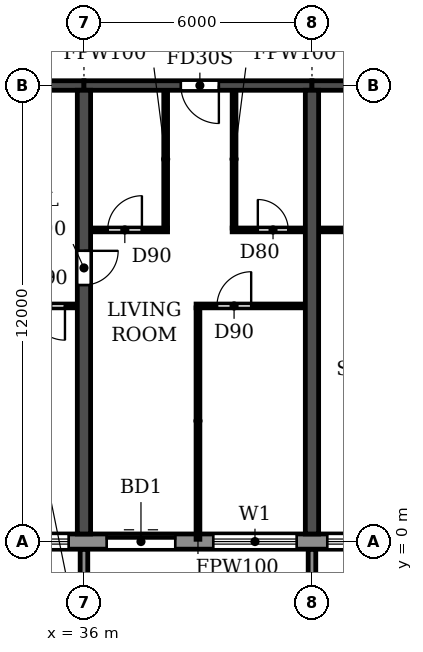
"""IFC4 building model, lengths in metres.
Left out: names, types, materials, properties, quantities, classifications, styles, units other than length and angle.
Written with IfcOpenShell. Run it as: python <this file> out.ifc"""

import sys

from ifc_helpers import new_model, si_unit, direction, frame, frame_2d, origin, place, context, subcontext, project, spatial, polyline, rectangle, outline, extrude, source, transform, mapped, element, fill, save


model = new_model("IFC4")
c1 = context("Model", 3, precision=1e-05, world=origin(), true_north=direction((0.0, 1.0)))
c2 = subcontext(c1, "Body", "Model", "MODEL_VIEW")
j1 = project(units=[si_unit("LENGTHUNIT", "METRE"), si_unit("PLANEANGLEUNIT", "RADIAN")], contexts=[c1])
p1 = place(None, origin())
s1 = spatial("IfcSite", under=j1, at=p1, CompositionType="ELEMENT")
p2 = place(p1, origin())
s2 = spatial("IfcBuilding", under=s1, at=p2, CompositionType="ELEMENT")
p3 = place(p2, frame((0.0, 0.0, 76.2)))
s3 = spatial("IfcBuildingStorey", under=s2, at=p3, CompositionType="ELEMENT", Elevation=76.2)
p4 = place(p3, frame((36.0, 0.2, 0.0), z_axis=(0.0, 0.0, 1.0), x_axis=(0.0, 1.0, 0.0)))
e1 = element("IfcWall", 1, at=p4, inside=s3, PredefinedType="SHEAR", context=c2, shape_type="SweptSolid", body=[
    extrude(rectangle(XDim=11.675, YDim=0.35, at=frame_2d((5.837, 0.0))), origin(), (0.0, 0.0, 1.0), 3.06),
])
p5 = place(p4, frame((6.55, 0.0, 0.0)))
e2 = element("IfcOpeningElement", 2, at=p5, cuts=e1, PredefinedType="OPENING", context=c2, shape_type="SweptSolid", body=[
    extrude(rectangle(XDim=0.9, YDim=2.1, at=frame_2d((0.45, 1.05))), frame((0.0, 0.185, 0.0), z_axis=(0.0, -1.0, 0.0), x_axis=(1.0, 0.0, 0.0)), (0.0, 0.0, 1.0), 0.37),
])
p6 = place(p3, frame((42.0, 0.2, 0.0), z_axis=(0.0, 0.0, 1.0), x_axis=(0.0, 1.0, 0.0)))
e3 = element("IfcWall", 3, at=p6, inside=s3, PredefinedType="SHEAR", context=c2, shape_type="SweptSolid", body=[
    extrude(rectangle(XDim=11.675, YDim=0.35, at=frame_2d((5.837, 0.0))), origin(), (0.0, 0.0, 1.0), 3.06),
])
p7 = place(p3, frame((30.0, 12.0, 0.0), z_axis=(0.0, 0.0, 1.0), x_axis=(1.0, 0.0, 0.0)))
e4 = element("IfcWall", 4, at=p7, inside=s3, PredefinedType="SHEAR", context=c2, shape_type="SweptSolid", body=[
    extrude(rectangle(XDim=6.0, YDim=0.25, at=frame_2d((3.0, 0.0))), origin(), (0.0, 0.0, 1.0), 2.46),
])
p8 = place(p3, frame((36.0, 12.0, 0.0), z_axis=(0.0, 0.0, 1.0), x_axis=(1.0, 0.0, 0.0)))
e5 = element("IfcWall", 5, at=p8, inside=s3, PredefinedType="SHEAR", context=c2, shape_type="SweptSolid", body=[
    extrude(rectangle(XDim=6.0, YDim=0.25, at=frame_2d((3.0, 0.0))), origin(), (0.0, 0.0, 1.0), 2.46),
])
p9 = place(p8, frame((2.55, 0.0, 0.0)))
e6 = element("IfcOpeningElement", 6, at=p9, cuts=e5, PredefinedType="OPENING", context=c2, shape_type="SweptSolid", body=[
    extrude(rectangle(XDim=1.0, YDim=2.1, at=frame_2d((0.5, 1.05))), frame((0.0, 0.135, 0.0), z_axis=(0.0, -1.0, 0.0), x_axis=(1.0, 0.0, 0.0)), (0.0, 0.0, 1.0), 0.27),
])
p10 = place(p3, frame((42.0, 12.0, 0.0), z_axis=(0.0, 0.0, 1.0), x_axis=(1.0, 0.0, 0.0)))
e7 = element("IfcWall", 7, at=p10, inside=s3, PredefinedType="SHEAR", context=c2, shape_type="SweptSolid", body=[
    extrude(rectangle(XDim=6.0, YDim=0.25, at=frame_2d((3.0, 0.0))), origin(), (0.0, 0.0, 1.0), 2.46),
])
p11 = place(p10, frame((2.55, 0.0, 0.0)))
e8 = element("IfcOpeningElement", 8, at=p11, cuts=e7, PredefinedType="OPENING", context=c2, shape_type="SweptSolid", body=[
    extrude(rectangle(XDim=1.0, YDim=2.1, at=frame_2d((0.5, 1.05))), frame((0.0, 0.135, 0.0), z_axis=(0.0, -1.0, 0.0), x_axis=(1.0, 0.0, 0.0)), (0.0, 0.0, 1.0), 0.27),
])
p12 = place(p3, frame((10.683, 0.0, 0.0), z_axis=(0.0, 0.0, 1.0), x_axis=(1.0, 0.0, 0.0)))
e9 = element("IfcWall", 9, at=p12, inside=s3, PredefinedType="STANDARD", context=c2, shape_type="SweptSolid", body=[
    extrude(rectangle(XDim=80.634, YDim=0.4, at=frame_2d((40.317, 0.0))), origin(), (0.0, 0.0, 1.0), 3.06),
])
p13 = place(p12, frame((1.717, 0.0, 0.9)))
e10 = element("IfcOpeningElement", 10, at=p13, cuts=e9, PredefinedType="OPENING", context=c2, shape_type="SweptSolid", body=[
    extrude(rectangle(XDim=2.2, YDim=1.5, at=frame_2d((1.1, 0.75))), frame((0.0, 0.21, 0.0), z_axis=(0.0, -1.0, 0.0), x_axis=(1.0, 0.0, 0.0)), (0.0, 0.0, 1.0), 0.42),
])
p14 = place(p12, frame((4.917, 0.0, 0.0)))
e11 = element("IfcOpeningElement", 11, at=p14, cuts=e9, PredefinedType="OPENING", context=c2, shape_type="SweptSolid", body=[
    extrude(rectangle(XDim=1.8, YDim=2.4, at=frame_2d((0.9, 1.2))), frame((0.0, 0.21, 0.0), z_axis=(0.0, -1.0, 0.0), x_axis=(1.0, 0.0, 0.0)), (0.0, 0.0, 1.0), 0.42),
])
p15 = place(p12, frame((7.717, 0.0, 0.9)))
e12 = element("IfcOpeningElement", 12, at=p15, cuts=e9, PredefinedType="OPENING", context=c2, shape_type="SweptSolid", body=[
    extrude(rectangle(XDim=2.2, YDim=1.5, at=frame_2d((1.1, 0.75))), frame((0.0, 0.21, 0.0), z_axis=(0.0, -1.0, 0.0), x_axis=(1.0, 0.0, 0.0)), (0.0, 0.0, 1.0), 0.42),
])
p16 = place(p12, frame((10.717, 0.0, 0.9)))
e13 = element("IfcOpeningElement", 13, at=p16, cuts=e9, PredefinedType="OPENING", context=c2, shape_type="SweptSolid", body=[
    extrude(rectangle(XDim=2.2, YDim=1.5, at=frame_2d((1.1, 0.75))), frame((0.0, 0.21, 0.0), z_axis=(0.0, -1.0, 0.0), x_axis=(1.0, 0.0, 0.0)), (0.0, 0.0, 1.0), 0.42),
])
p17 = place(p12, frame((13.717, 0.0, 0.9)))
e14 = element("IfcOpeningElement", 14, at=p17, cuts=e9, PredefinedType="OPENING", context=c2, shape_type="SweptSolid", body=[
    extrude(rectangle(XDim=2.2, YDim=1.5, at=frame_2d((1.1, 0.75))), frame((0.0, 0.21, 0.0), z_axis=(0.0, -1.0, 0.0), x_axis=(1.0, 0.0, 0.0)), (0.0, 0.0, 1.0), 0.42),
])
p18 = place(p12, frame((16.917, 0.0, 0.0)))
e15 = element("IfcOpeningElement", 15, at=p18, cuts=e9, PredefinedType="OPENING", context=c2, shape_type="SweptSolid", body=[
    extrude(rectangle(XDim=1.8, YDim=2.4, at=frame_2d((0.9, 1.2))), frame((0.0, 0.21, 0.0), z_axis=(0.0, -1.0, 0.0), x_axis=(1.0, 0.0, 0.0)), (0.0, 0.0, 1.0), 0.42),
])
p19 = place(p12, frame((19.717, 0.0, 0.9)))
e16 = element("IfcOpeningElement", 16, at=p19, cuts=e9, PredefinedType="OPENING", context=c2, shape_type="SweptSolid", body=[
    extrude(rectangle(XDim=2.2, YDim=1.5, at=frame_2d((1.1, 0.75))), frame((0.0, 0.21, 0.0), z_axis=(0.0, -1.0, 0.0), x_axis=(1.0, 0.0, 0.0)), (0.0, 0.0, 1.0), 0.42),
])
p20 = place(p12, frame((22.717, 0.0, 0.9)))
e17 = element("IfcOpeningElement", 17, at=p20, cuts=e9, PredefinedType="OPENING", context=c2, shape_type="SweptSolid", body=[
    extrude(rectangle(XDim=2.2, YDim=1.5, at=frame_2d((1.1, 0.75))), frame((0.0, 0.21, 0.0), z_axis=(0.0, -1.0, 0.0), x_axis=(1.0, 0.0, 0.0)), (0.0, 0.0, 1.0), 0.42),
])
p21 = place(p12, frame((25.917, 0.0, 0.0)))
e18 = element("IfcOpeningElement", 18, at=p21, cuts=e9, PredefinedType="OPENING", context=c2, shape_type="SweptSolid", body=[
    extrude(rectangle(XDim=1.8, YDim=2.4, at=frame_2d((0.9, 1.2))), frame((0.0, 0.21, 0.0), z_axis=(0.0, -1.0, 0.0), x_axis=(1.0, 0.0, 0.0)), (0.0, 0.0, 1.0), 0.42),
])
p22 = place(p12, frame((28.717, 0.0, 0.9)))
e19 = element("IfcOpeningElement", 19, at=p22, cuts=e9, PredefinedType="OPENING", context=c2, shape_type="SweptSolid", body=[
    extrude(rectangle(XDim=2.2, YDim=1.5, at=frame_2d((1.1, 0.75))), frame((0.0, 0.21, 0.0), z_axis=(0.0, -1.0, 0.0), x_axis=(1.0, 0.0, 0.0)), (0.0, 0.0, 1.0), 0.42),
])
p23 = place(p12, frame((31.717, 0.0, 0.9)))
e20 = element("IfcOpeningElement", 20, at=p23, cuts=e9, PredefinedType="OPENING", context=c2, shape_type="SweptSolid", body=[
    extrude(rectangle(XDim=2.2, YDim=1.5, at=frame_2d((1.1, 0.75))), frame((0.0, 0.21, 0.0), z_axis=(0.0, -1.0, 0.0), x_axis=(1.0, 0.0, 0.0)), (0.0, 0.0, 1.0), 0.42),
])
p24 = place(p12, frame((34.717, 0.0, 0.9)))
e21 = element("IfcOpeningElement", 21, at=p24, cuts=e9, PredefinedType="OPENING", context=c2, shape_type="SweptSolid", body=[
    extrude(rectangle(XDim=2.2, YDim=1.5, at=frame_2d((1.1, 0.75))), frame((0.0, 0.21, 0.0), z_axis=(0.0, -1.0, 0.0), x_axis=(1.0, 0.0, 0.0)), (0.0, 0.0, 1.0), 0.42),
])
p25 = place(p12, frame((37.917, 0.0, 0.0)))
e22 = element("IfcOpeningElement", 22, at=p25, cuts=e9, PredefinedType="OPENING", context=c2, shape_type="SweptSolid", body=[
    extrude(rectangle(XDim=1.8, YDim=2.4, at=frame_2d((0.9, 1.2))), frame((0.0, 0.21, 0.0), z_axis=(0.0, -1.0, 0.0), x_axis=(1.0, 0.0, 0.0)), (0.0, 0.0, 1.0), 0.42),
])
p26 = place(p12, frame((40.717, 0.0, 0.9)))
e23 = element("IfcOpeningElement", 23, at=p26, cuts=e9, PredefinedType="OPENING", context=c2, shape_type="SweptSolid", body=[
    extrude(rectangle(XDim=2.2, YDim=1.5, at=frame_2d((1.1, 0.75))), frame((0.0, 0.21, 0.0), z_axis=(0.0, -1.0, 0.0), x_axis=(1.0, 0.0, 0.0)), (0.0, 0.0, 1.0), 0.42),
])
p27 = place(p12, frame((43.717, 0.0, 0.9)))
e24 = element("IfcOpeningElement", 24, at=p27, cuts=e9, PredefinedType="OPENING", context=c2, shape_type="SweptSolid", body=[
    extrude(rectangle(XDim=2.2, YDim=1.5, at=frame_2d((1.1, 0.75))), frame((0.0, 0.21, 0.0), z_axis=(0.0, -1.0, 0.0), x_axis=(1.0, 0.0, 0.0)), (0.0, 0.0, 1.0), 0.42),
])
p28 = place(p12, frame((46.717, 0.0, 0.9)))
e25 = element("IfcOpeningElement", 25, at=p28, cuts=e9, PredefinedType="OPENING", context=c2, shape_type="SweptSolid", body=[
    extrude(rectangle(XDim=2.2, YDim=1.5, at=frame_2d((1.1, 0.75))), frame((0.0, 0.21, 0.0), z_axis=(0.0, -1.0, 0.0), x_axis=(1.0, 0.0, 0.0)), (0.0, 0.0, 1.0), 0.42),
])
p29 = place(p12, frame((49.917, 0.0, 0.0)))
e26 = element("IfcOpeningElement", 26, at=p29, cuts=e9, PredefinedType="OPENING", context=c2, shape_type="SweptSolid", body=[
    extrude(rectangle(XDim=1.8, YDim=2.4, at=frame_2d((0.9, 1.2))), frame((0.0, 0.21, 0.0), z_axis=(0.0, -1.0, 0.0), x_axis=(1.0, 0.0, 0.0)), (0.0, 0.0, 1.0), 0.42),
])
p30 = place(p12, frame((52.717, 0.0, 0.9)))
e27 = element("IfcOpeningElement", 27, at=p30, cuts=e9, PredefinedType="OPENING", context=c2, shape_type="SweptSolid", body=[
    extrude(rectangle(XDim=2.2, YDim=1.5, at=frame_2d((1.1, 0.75))), frame((0.0, 0.21, 0.0), z_axis=(0.0, -1.0, 0.0), x_axis=(1.0, 0.0, 0.0)), (0.0, 0.0, 1.0), 0.42),
])
p31 = place(p12, frame((55.717, 0.0, 0.9)))
e28 = element("IfcOpeningElement", 28, at=p31, cuts=e9, PredefinedType="OPENING", context=c2, shape_type="SweptSolid", body=[
    extrude(rectangle(XDim=2.2, YDim=1.5, at=frame_2d((1.1, 0.75))), frame((0.0, 0.21, 0.0), z_axis=(0.0, -1.0, 0.0), x_axis=(1.0, 0.0, 0.0)), (0.0, 0.0, 1.0), 0.42),
])
p32 = place(p12, frame((58.717, 0.0, 0.9)))
e29 = element("IfcOpeningElement", 29, at=p32, cuts=e9, PredefinedType="OPENING", context=c2, shape_type="SweptSolid", body=[
    extrude(rectangle(XDim=2.2, YDim=1.5, at=frame_2d((1.1, 0.75))), frame((0.0, 0.21, 0.0), z_axis=(0.0, -1.0, 0.0), x_axis=(1.0, 0.0, 0.0)), (0.0, 0.0, 1.0), 0.42),
])
p33 = place(p12, frame((61.717, 0.0, 0.9)))
e30 = element("IfcOpeningElement", 30, at=p33, cuts=e9, PredefinedType="OPENING", context=c2, shape_type="SweptSolid", body=[
    extrude(rectangle(XDim=2.2, YDim=1.5, at=frame_2d((1.1, 0.75))), frame((0.0, 0.21, 0.0), z_axis=(0.0, -1.0, 0.0), x_axis=(1.0, 0.0, 0.0)), (0.0, 0.0, 1.0), 0.42),
])
p34 = place(p12, frame((64.917, 0.0, 0.0)))
e31 = element("IfcOpeningElement", 31, at=p34, cuts=e9, PredefinedType="OPENING", context=c2, shape_type="SweptSolid", body=[
    extrude(rectangle(XDim=1.8, YDim=2.4, at=frame_2d((0.9, 1.2))), frame((0.0, 0.21, 0.0), z_axis=(0.0, -1.0, 0.0), x_axis=(1.0, 0.0, 0.0)), (0.0, 0.0, 1.0), 0.42),
])
p35 = place(p12, frame((67.717, 0.0, 0.9)))
e32 = element("IfcOpeningElement", 32, at=p35, cuts=e9, PredefinedType="OPENING", context=c2, shape_type="SweptSolid", body=[
    extrude(rectangle(XDim=2.2, YDim=1.5, at=frame_2d((1.1, 0.75))), frame((0.0, 0.21, 0.0), z_axis=(0.0, -1.0, 0.0), x_axis=(1.0, 0.0, 0.0)), (0.0, 0.0, 1.0), 0.42),
])
p36 = place(p12, frame((70.717, 0.0, 0.9)))
e33 = element("IfcOpeningElement", 33, at=p36, cuts=e9, PredefinedType="OPENING", context=c2, shape_type="SweptSolid", body=[
    extrude(rectangle(XDim=2.2, YDim=1.5, at=frame_2d((1.1, 0.75))), frame((0.0, 0.21, 0.0), z_axis=(0.0, -1.0, 0.0), x_axis=(1.0, 0.0, 0.0)), (0.0, 0.0, 1.0), 0.42),
])
p37 = place(p12, frame((73.917, 0.0, 0.0)))
e34 = element("IfcOpeningElement", 34, at=p37, cuts=e9, PredefinedType="OPENING", context=c2, shape_type="SweptSolid", body=[
    extrude(rectangle(XDim=1.8, YDim=2.4, at=frame_2d((0.9, 1.2))), frame((0.0, 0.21, 0.0), z_axis=(0.0, -1.0, 0.0), x_axis=(1.0, 0.0, 0.0)), (0.0, 0.0, 1.0), 0.42),
])
p38 = place(p12, frame((76.717, 0.0, 0.9)))
e35 = element("IfcOpeningElement", 35, at=p38, cuts=e9, PredefinedType="OPENING", context=c2, shape_type="SweptSolid", body=[
    extrude(rectangle(XDim=2.2, YDim=1.5, at=frame_2d((1.1, 0.75))), frame((0.0, 0.21, 0.0), z_axis=(0.0, -1.0, 0.0), x_axis=(1.0, 0.0, 0.0)), (0.0, 0.0, 1.0), 0.42),
])
m1 = source(origin(), c2, "Body", "SweptSolid", [
    extrude(outline(polyline([(0.0, 0.0), (0.2, 0.0), (0.2, 1.65), (0.0, 1.65), (0.0, 0.0)])), origin(), (0.0, 0.0, 1.0), 3.1),
])
for number, where in (
    (36, (35.9, -1.85, 0.0)),
    (37, (41.9, -1.85, 0.0)),
):
    element("IfcWall", number, at=place(p3, frame(where)), inside=s3, PredefinedType="STANDARD", context=c2, shape_type="MappedRepresentation", body=[
        mapped(m1, transform((0.0, 0.0, 0.0))),
    ])
p39 = place(p3, frame((30.185, 6.2, 0.0), z_axis=(0.0, 0.0, 1.0), x_axis=(1.0, 0.0, 0.0)))
e38 = element("IfcWall", 38, at=p39, inside=s3, PredefinedType="PARTITIONING", context=c2, shape_type="SweptSolid", body=[
    extrude(rectangle(XDim=5.63, YDim=0.1, at=frame_2d((2.815, 0.0))), origin(), (0.0, 0.0, 1.0), 3.06),
])
p40 = place(p39, frame((0.315, 0.0, 0.0)))
e39 = element("IfcOpeningElement", 39, at=p40, cuts=e38, PredefinedType="OPENING", context=c2, shape_type="SweptSolid", body=[
    extrude(rectangle(XDim=0.9, YDim=2.1, at=frame_2d((0.45, 1.05))), frame((0.0, 0.06, 0.0), z_axis=(0.0, -1.0, 0.0), x_axis=(1.0, 0.0, 0.0)), (0.0, 0.0, 1.0), 0.12),
])
p41 = place(p39, frame((4.415, 0.0, 0.0)))
e40 = element("IfcOpeningElement", 40, at=p41, cuts=e38, PredefinedType="OPENING", context=c2, shape_type="SweptSolid", body=[
    extrude(rectangle(XDim=0.9, YDim=2.1, at=frame_2d((0.45, 1.05))), frame((0.0, 0.06, 0.0), z_axis=(0.0, -1.0, 0.0), x_axis=(1.0, 0.0, 0.0)), (0.0, 0.0, 1.0), 0.12),
])
p42 = place(p3, frame((38.95, 6.2, 0.0), z_axis=(0.0, 0.0, 1.0), x_axis=(1.0, 0.0, 0.0)))
e41 = element("IfcWall", 41, at=p42, inside=s3, PredefinedType="PARTITIONING", context=c2, shape_type="SweptSolid", body=[
    extrude(rectangle(XDim=2.865, YDim=0.1, at=frame_2d((1.433, 0.0))), origin(), (0.0, 0.0, 1.0), 3.06),
])
p43 = place(p42, frame((0.55, 0.0, 0.0)))
e42 = element("IfcOpeningElement", 42, at=p43, cuts=e41, PredefinedType="OPENING", context=c2, shape_type="SweptSolid", body=[
    extrude(rectangle(XDim=0.9, YDim=2.1, at=frame_2d((0.45, 1.05))), frame((0.0, 0.06, 0.0), z_axis=(0.0, -1.0, 0.0), x_axis=(1.0, 0.0, 0.0)), (0.0, 0.0, 1.0), 0.12),
])
p44 = place(p3, frame((36.185, 8.2, 0.0), z_axis=(0.0, 0.0, 1.0), x_axis=(1.0, 0.0, 0.0)))
e43 = element("IfcWall", 43, at=p44, inside=s3, PredefinedType="PARTITIONING", context=c2, shape_type="SweptSolid", body=[
    extrude(rectangle(XDim=2.015, YDim=0.1, at=frame_2d((1.007, 0.0))), origin(), (0.0, 0.0, 1.0), 3.06),
])
p45 = place(p44, frame((0.44, 0.0, 0.0)))
e44 = element("IfcOpeningElement", 44, at=p45, cuts=e43, PredefinedType="OPENING", context=c2, shape_type="SweptSolid", body=[
    extrude(rectangle(XDim=0.9, YDim=2.1, at=frame_2d((0.45, 1.05))), frame((0.0, 0.06, 0.0), z_axis=(0.0, -1.0, 0.0), x_axis=(1.0, 0.0, 0.0)), (0.0, 0.0, 1.0), 0.12),
])
p46 = place(p3, frame((39.9, 8.2, 0.0), z_axis=(0.0, 0.0, 1.0), x_axis=(1.0, 0.0, 0.0)))
e45 = element("IfcWall", 45, at=p46, inside=s3, PredefinedType="PARTITIONING", context=c2, shape_type="SweptSolid", body=[
    extrude(rectangle(XDim=1.915, YDim=0.1, at=frame_2d((0.958, 0.0))), origin(), (0.0, 0.0, 1.0), 3.06),
])
p47 = place(p46, frame((0.675, 0.0, 0.0)))
e46 = element("IfcOpeningElement", 46, at=p47, cuts=e45, PredefinedType="OPENING", context=c2, shape_type="SweptSolid", body=[
    extrude(rectangle(XDim=0.8, YDim=2.1, at=frame_2d((0.4, 1.05))), frame((0.0, 0.06, 0.0), z_axis=(0.0, -1.0, 0.0), x_axis=(1.0, 0.0, 0.0)), (0.0, 0.0, 1.0), 0.12),
])
p48 = place(p3, frame((42.185, 8.2, 0.0), z_axis=(0.0, 0.0, 1.0), x_axis=(1.0, 0.0, 0.0)))
e47 = element("IfcWall", 47, at=p48, inside=s3, PredefinedType="PARTITIONING", context=c2, shape_type="SweptSolid", body=[
    extrude(rectangle(XDim=2.015, YDim=0.1, at=frame_2d((1.007, 0.0))), origin(), (0.0, 0.0, 1.0), 3.06),
])
p49 = place(p3, frame((38.15, 8.25, 0.0), z_axis=(0.0, 0.0, 1.0), x_axis=(0.0, 1.0, 0.0)))
e48 = element("IfcWall", 48, at=p49, inside=s3, PredefinedType="PARTITIONING", context=c2, shape_type="SweptSolid", body=[
    extrude(rectangle(XDim=3.615, YDim=0.1, at=frame_2d((1.808, 0.0))), origin(), (0.0, 0.0, 1.0), 3.06),
])
p50 = place(p3, frame((39.0, 0.06, 0.0), z_axis=(0.0, 0.0, 1.0), x_axis=(0.0, 1.0, 0.0)))
e49 = element("IfcWall", 49, at=p50, inside=s3, PredefinedType="PARTITIONING", context=c2, shape_type="SweptSolid", body=[
    extrude(rectangle(XDim=6.09, YDim=0.1, at=frame_2d((3.045, 0.0))), origin(), (0.0, 0.0, 1.0), 3.06),
])
p51 = place(p3, frame((39.95, 8.25, 0.0), z_axis=(0.0, 0.0, 1.0), x_axis=(0.0, 1.0, 0.0)))
e50 = element("IfcWall", 50, at=p51, inside=s3, PredefinedType="PARTITIONING", context=c2, shape_type="SweptSolid", body=[
    extrude(rectangle(XDim=3.615, YDim=0.1, at=frame_2d((1.808, 0.0))), origin(), (0.0, 0.0, 1.0), 3.06),
])
p52 = place(p20, origin())
e51 = element("IfcWindow", 51, at=p52, inside=s3, PartitioningType="DOUBLE_PANEL_HORIZONTAL", PredefinedType="WINDOW", context=c2, shape_type="SweptSolid", body=[
    extrude(rectangle(XDim=2.2, YDim=1.5, at=frame_2d((1.1, 0.75))), frame((0.0, 0.03, 0.0), z_axis=(0.0, -1.0, 0.0), x_axis=(1.0, 0.0, 0.0)), (0.0, 0.0, 1.0), 0.06),
])
fill(e17, e51)
p53 = place(p21, origin())
e52 = element("IfcDoor", 52, at=p53, inside=s3, OperationType="DOUBLE_DOOR_SLIDING", PredefinedType="DOOR", context=c2, shape_type="SweptSolid", body=[
    extrude(rectangle(XDim=1.8, YDim=2.4, at=frame_2d((0.9, 1.2))), frame((0.0, 0.025, 0.0), z_axis=(0.0, -1.0, 0.0), x_axis=(1.0, 0.0, 0.0)), (0.0, 0.0, 1.0), 0.05),
])
fill(e18, e52)
p54 = place(p22, origin())
e53 = element("IfcWindow", 53, at=p54, inside=s3, PartitioningType="DOUBLE_PANEL_HORIZONTAL", PredefinedType="WINDOW", context=c2, shape_type="SweptSolid", body=[
    extrude(rectangle(XDim=2.2, YDim=1.5, at=frame_2d((1.1, 0.75))), frame((0.0, 0.03, 0.0), z_axis=(0.0, -1.0, 0.0), x_axis=(1.0, 0.0, 0.0)), (0.0, 0.0, 1.0), 0.06),
])
fill(e19, e53)
p55 = place(p23, origin())
e54 = element("IfcWindow", 54, at=p55, inside=s3, PartitioningType="DOUBLE_PANEL_HORIZONTAL", PredefinedType="WINDOW", context=c2, shape_type="SweptSolid", body=[
    extrude(rectangle(XDim=2.2, YDim=1.5, at=frame_2d((1.1, 0.75))), frame((0.0, 0.03, 0.0), z_axis=(0.0, -1.0, 0.0), x_axis=(1.0, 0.0, 0.0)), (0.0, 0.0, 1.0), 0.06),
])
fill(e20, e54)
p56 = place(p41, frame((0.9, 0.0, 0.0), z_axis=(0.0, 0.0, 1.0), x_axis=(-1.0, 0.0, 0.0)))
e55 = element("IfcDoor", 55, at=p56, inside=s3, OperationType="SINGLE_SWING_LEFT", PredefinedType="DOOR", context=c2, shape_type="SweptSolid", body=[
    extrude(rectangle(XDim=0.9, YDim=2.1, at=frame_2d((0.45, 1.05))), frame((0.0, 0.025, 0.0), z_axis=(0.0, -1.0, 0.0), x_axis=(1.0, 0.0, 0.0)), (0.0, 0.0, 1.0), 0.05),
])
fill(e40, e55)
p57 = place(p5, frame((0.9, 0.0, 0.0), z_axis=(0.0, 0.0, 1.0), x_axis=(-1.0, 0.0, 0.0)))
e56 = element("IfcDoor", 56, at=p57, inside=s3, OperationType="SINGLE_SWING_LEFT", PredefinedType="DOOR", context=c2, shape_type="SweptSolid", body=[
    extrude(rectangle(XDim=0.9, YDim=2.1, at=frame_2d((0.45, 1.05))), frame((0.0, 0.025, 0.0), z_axis=(0.0, -1.0, 0.0), x_axis=(1.0, 0.0, 0.0)), (0.0, 0.0, 1.0), 0.05),
])
fill(e2, e56)
p58 = place(p45, origin())
e57 = element("IfcDoor", 57, at=p58, inside=s3, OperationType="SINGLE_SWING_RIGHT", PredefinedType="DOOR", context=c2, shape_type="SweptSolid", body=[
    extrude(rectangle(XDim=0.9, YDim=2.1, at=frame_2d((0.45, 1.05))), frame((0.0, 0.025, 0.0), z_axis=(0.0, -1.0, 0.0), x_axis=(1.0, 0.0, 0.0)), (0.0, 0.0, 1.0), 0.05),
])
fill(e44, e57)
p59 = place(p9, frame((1.0, 0.0, 0.0), z_axis=(0.0, 0.0, 1.0), x_axis=(-1.0, 0.0, 0.0)))
e58 = element("IfcDoor", 58, at=p59, inside=s3, OperationType="SINGLE_SWING_LEFT", PredefinedType="DOOR", context=c2, shape_type="SweptSolid", body=[
    extrude(rectangle(XDim=1.0, YDim=2.1, at=frame_2d((0.5, 1.05))), frame((0.0, 0.025, 0.0), z_axis=(0.0, -1.0, 0.0), x_axis=(1.0, 0.0, 0.0)), (0.0, 0.0, 1.0), 0.05),
])
fill(e6, e58)
p60 = place(p43, origin())
e59 = element("IfcDoor", 59, at=p60, inside=s3, OperationType="SINGLE_SWING_RIGHT", PredefinedType="DOOR", context=c2, shape_type="SweptSolid", body=[
    extrude(rectangle(XDim=0.9, YDim=2.1, at=frame_2d((0.45, 1.05))), frame((0.0, 0.025, 0.0), z_axis=(0.0, -1.0, 0.0), x_axis=(1.0, 0.0, 0.0)), (0.0, 0.0, 1.0), 0.05),
])
fill(e42, e59)
p61 = place(p47, origin())
e60 = element("IfcDoor", 60, at=p61, inside=s3, OperationType="SINGLE_SWING_LEFT", PredefinedType="DOOR", context=c2, shape_type="SweptSolid", body=[
    extrude(rectangle(XDim=0.8, YDim=2.1, at=frame_2d((0.4, 1.05))), frame((0.0, 0.025, 0.0), z_axis=(0.0, -1.0, 0.0), x_axis=(1.0, 0.0, 0.0)), (0.0, 0.0, 1.0), 0.05),
])
fill(e46, e60)
save(model, sys.argv[1])
